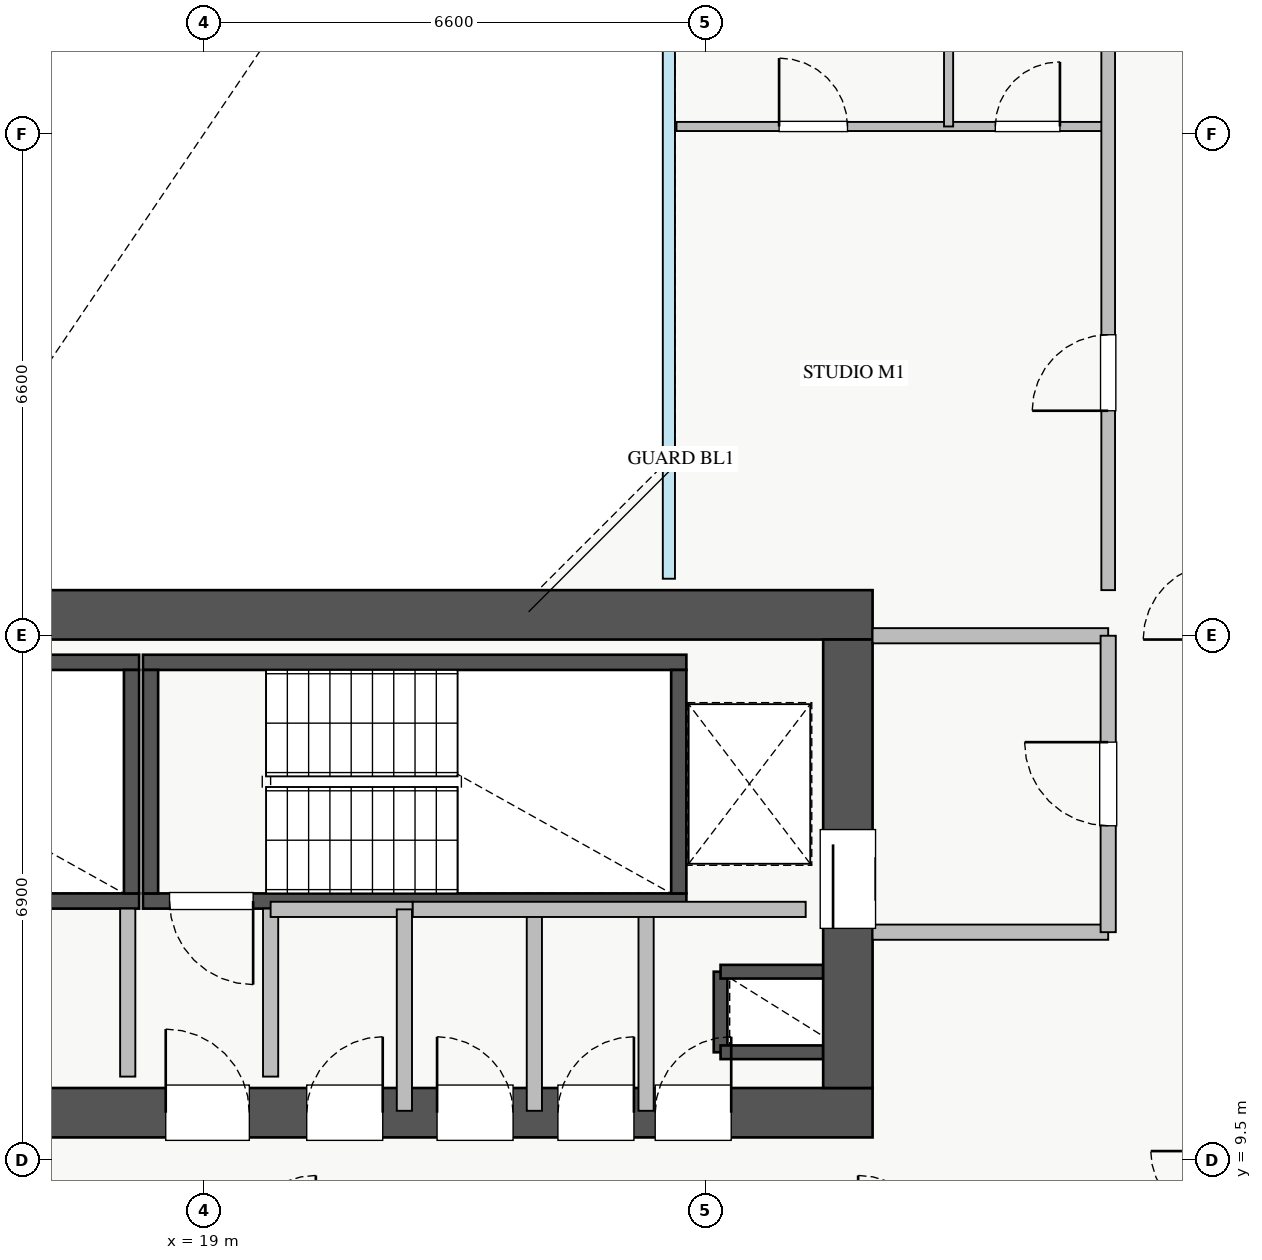
"""IFC4 building model, lengths in metres.
Left out: names, types, materials, properties, quantities, classifications, styles, units other than length and angle.
Written with IfcOpenShell. Run it as: python <this file> out.ifc"""

import sys

from ifc_helpers import new_model, si_unit, direction, frame, frame_2d, origin, place, context, subcontext, project, spatial, rectangle, extrude, source, transform, mapped, element, fill, save


model = new_model("IFC4")
c1 = context("Model", 3, precision=1e-05, world=origin(), true_north=direction((0.0, 1.0)))
c2 = subcontext(c1, "Body", "Model", "MODEL_VIEW")
j1 = project(units=[si_unit("LENGTHUNIT", "METRE"), si_unit("PLANEANGLEUNIT", "RADIAN")], contexts=[c1])
p1 = place(None, origin())
s1 = spatial("IfcSite", under=j1, at=p1, CompositionType="ELEMENT")
p2 = place(p1, origin())
s2 = spatial("IfcBuilding", under=s1, at=p2, CompositionType="ELEMENT")
p3 = place(p2, frame((0.0, 0.0, 143.75)))
s3 = spatial("IfcBuildingStorey", under=s2, at=p3, CompositionType="ELEMENT", Elevation=143.75)
p4 = place(p3, frame((25.8, 10.92, 0.0), z_axis=(0.0, 0.0, 1.0), x_axis=(0.0, 1.0, 0.0)))
e1 = element("IfcWall", 1, at=p4, inside=s3, PredefinedType="SHEAR", context=c2, shape_type="SweptSolid", body=[
    extrude(rectangle(XDim=1.06, YDim=0.18, at=frame_2d((0.53, 0.0))), origin(), (0.0, 0.0, 1.0), 3.07),
])
for number, where, z_axis, x_axis in (
    (2, (25.8, 11.98, 0.0), (0.0, 0.0, 1.0), (1.0, 0.0, 0.0)),
    (3, (25.8, 10.92, 0.0), (0.0, 0.0, 1.0), (1.0, 0.0, 0.0)),
):
    element("IfcWall", number, at=place(p3, frame(where, z_axis=z_axis, x_axis=x_axis)), inside=s3, PredefinedType="SHEAR", context=c2, shape_type="SweptSolid", body=[
        extrude(rectangle(XDim=1.35, YDim=0.18, at=frame_2d((0.675, 0.0))), origin(), (0.0, 0.0, 1.0), 3.07),
    ])
p5 = place(p3, frame((10.85, 12.91, 0.0), z_axis=(0.0, 0.0, 1.0), x_axis=(1.0, 0.0, 0.0)))
e4 = element("IfcWall", 4, at=p5, inside=s3, PredefinedType="SHEAR", context=c2, shape_type="SweptSolid", body=[
    extrude(rectangle(XDim=7.3, YDim=0.2, at=frame_2d((3.65, 0.0))), origin(), (0.0, 0.0, 1.0), 3.25),
])
p6 = place(p5, frame((0.35, 0.0, 0.0)))
e5 = element("IfcOpeningElement", 5, at=p6, cuts=e4, PredefinedType="OPENING", context=c2, shape_type="SweptSolid", body=[
    extrude(rectangle(XDim=1.1, YDim=2.05, at=frame_2d((0.55, 1.025))), frame((0.0, 0.11, 0.0), z_axis=(0.0, -1.0, 0.0), x_axis=(1.0, 0.0, 0.0)), (0.0, 0.0, 1.0), 0.22),
])
p7 = place(p3, frame((10.85, 16.05, 0.0), z_axis=(0.0, 0.0, 1.0), x_axis=(1.0, 0.0, 0.0)))
e6 = element("IfcWall", 6, at=p7, inside=s3, PredefinedType="SHEAR", context=c2, shape_type="SweptSolid", body=[
    extrude(rectangle(XDim=7.3, YDim=0.2, at=frame_2d((3.65, 0.0))), origin(), (0.0, 0.0, 1.0), 3.25),
])
p8 = place(p3, frame((18.05, 13.01, 0.0), z_axis=(0.0, 0.0, 1.0), x_axis=(0.0, 1.0, 0.0)))
e7 = element("IfcWall", 7, at=p8, inside=s3, PredefinedType="SHEAR", context=c2, shape_type="SweptSolid", body=[
    extrude(rectangle(XDim=2.94, YDim=0.2, at=frame_2d((1.47, 0.0))), origin(), (0.0, 0.0, 1.0), 3.25),
])
p9 = place(p3, frame((18.2, 12.91, 0.0), z_axis=(0.0, 0.0, 1.0), x_axis=(1.0, 0.0, 0.0)))
e8 = element("IfcWall", 8, at=p9, inside=s3, PredefinedType="SHEAR", context=c2, shape_type="SweptSolid", body=[
    extrude(rectangle(XDim=7.15, YDim=0.2, at=frame_2d((3.575, 0.0))), origin(), (0.0, 0.0, 1.0), 3.25),
])
p10 = place(p9, frame((0.35, 0.0, 0.0)))
e9 = element("IfcOpeningElement", 9, at=p10, cuts=e8, PredefinedType="OPENING", context=c2, shape_type="SweptSolid", body=[
    extrude(rectangle(XDim=1.1, YDim=2.05, at=frame_2d((0.55, 1.025))), frame((0.0, 0.11, 0.0), z_axis=(0.0, -1.0, 0.0), x_axis=(1.0, 0.0, 0.0)), (0.0, 0.0, 1.0), 0.22),
])
p11 = place(p3, frame((18.2, 16.05, 0.0), z_axis=(0.0, 0.0, 1.0), x_axis=(1.0, 0.0, 0.0)))
e10 = element("IfcWall", 10, at=p11, inside=s3, PredefinedType="SHEAR", context=c2, shape_type="SweptSolid", body=[
    extrude(rectangle(XDim=7.15, YDim=0.2, at=frame_2d((3.575, 0.0))), origin(), (0.0, 0.0, 1.0), 3.25),
])
for number, where, z_axis, x_axis in (
    (11, (18.3, 13.01, 0.0), (0.0, 0.0, 1.0), (0.0, 1.0, 0.0)),
    (12, (25.25, 13.01, 0.0), (0.0, 0.0, 1.0), (0.0, 1.0, 0.0)),
):
    element("IfcWall", number, at=place(p3, frame(where, z_axis=z_axis, x_axis=x_axis)), inside=s3, PredefinedType="SHEAR", context=c2, shape_type="SweptSolid", body=[
        extrude(rectangle(XDim=2.94, YDim=0.2, at=frame_2d((1.47, 0.0))), origin(), (0.0, 0.0, 1.0), 3.25),
    ])
p12 = place(p3, frame((10.2, 10.125, 0.0), z_axis=(0.0, 0.0, 1.0), x_axis=(1.0, 0.0, 0.0)))
e13 = element("IfcWall", 13, at=p12, inside=s3, PredefinedType="SHEAR", context=c2, shape_type="SweptSolid", body=[
    extrude(rectangle(XDim=17.6, YDim=0.65, at=frame_2d((8.8, 0.0))), origin(), (0.0, 0.0, 1.0), 3.25),
])
p13 = place(p12, frame((1.15, 0.0, 0.0)))
e14 = element("IfcOpeningElement", 14, at=p13, cuts=e13, PredefinedType="OPENING", context=c2, shape_type="SweptSolid", body=[
    extrude(rectangle(XDim=1.1, YDim=2.05, at=frame_2d((0.55, 1.025))), frame((0.0, 0.335, 0.0), z_axis=(0.0, -1.0, 0.0), x_axis=(1.0, 0.0, 0.0)), (0.0, 0.0, 1.0), 0.67),
])
p14 = place(p12, frame((8.3, 0.0, 0.0)))
e15 = element("IfcOpeningElement", 15, at=p14, cuts=e13, PredefinedType="OPENING", context=c2, shape_type="SweptSolid", body=[
    extrude(rectangle(XDim=1.1, YDim=2.05, at=frame_2d((0.55, 1.025))), frame((0.0, 0.335, 0.0), z_axis=(0.0, -1.0, 0.0), x_axis=(1.0, 0.0, 0.0)), (0.0, 0.0, 1.0), 0.67),
])
p15 = place(p12, frame((4.9, 0.0, 0.0)))
e16 = element("IfcOpeningElement", 16, at=p15, cuts=e13, PredefinedType="OPENING", context=c2, shape_type="SweptSolid", body=[
    extrude(rectangle(XDim=1.1, YDim=2.05, at=frame_2d((0.55, 1.025))), frame((0.0, 0.335, 0.0), z_axis=(0.0, -1.0, 0.0), x_axis=(1.0, 0.0, 0.0)), (0.0, 0.0, 1.0), 0.67),
])
p16 = place(p12, frame((14.74, 0.0, 0.0)))
e17 = element("IfcOpeningElement", 17, at=p16, cuts=e13, PredefinedType="OPENING", context=c2, shape_type="SweptSolid", body=[
    extrude(rectangle(XDim=1.0, YDim=2.05, at=frame_2d((0.5, 1.025))), frame((0.0, 0.335, 0.0), z_axis=(0.0, -1.0, 0.0), x_axis=(1.0, 0.0, 0.0)), (0.0, 0.0, 1.0), 0.67),
])
p17 = place(p12, frame((10.155, 0.0, 0.0)))
e18 = element("IfcOpeningElement", 18, at=p17, cuts=e13, PredefinedType="OPENING", context=c2, shape_type="SweptSolid", body=[
    extrude(rectangle(XDim=1.0, YDim=2.05, at=frame_2d((0.5, 1.025))), frame((0.0, 0.335, 0.0), z_axis=(0.0, -1.0, 0.0), x_axis=(1.0, 0.0, 0.0)), (0.0, 0.0, 1.0), 0.67),
])
p18 = place(p12, frame((11.87, 0.0, 0.0)))
e19 = element("IfcOpeningElement", 19, at=p18, cuts=e13, PredefinedType="OPENING", context=c2, shape_type="SweptSolid", body=[
    extrude(rectangle(XDim=1.0, YDim=2.05, at=frame_2d((0.5, 1.025))), frame((0.0, 0.335, 0.0), z_axis=(0.0, -1.0, 0.0), x_axis=(1.0, 0.0, 0.0)), (0.0, 0.0, 1.0), 0.67),
])
p19 = place(p12, frame((13.46, 0.0, 0.0)))
e20 = element("IfcOpeningElement", 20, at=p19, cuts=e13, PredefinedType="OPENING", context=c2, shape_type="SweptSolid", body=[
    extrude(rectangle(XDim=1.0, YDim=2.05, at=frame_2d((0.5, 1.025))), frame((0.0, 0.335, 0.0), z_axis=(0.0, -1.0, 0.0), x_axis=(1.0, 0.0, 0.0)), (0.0, 0.0, 1.0), 0.67),
])
p20 = place(p3, frame((10.2, 16.675, 0.0), z_axis=(0.0, 0.0, 1.0), x_axis=(1.0, 0.0, 0.0)))
e21 = element("IfcWall", 21, at=p20, inside=s3, PredefinedType="SHEAR", context=c2, shape_type="SweptSolid", body=[
    extrude(rectangle(XDim=17.6, YDim=0.65, at=frame_2d((8.8, 0.0))), origin(), (0.0, 0.0, 1.0), 3.25),
])
p21 = place(p3, frame((27.475, 10.45, 0.0), z_axis=(0.0, 0.0, 1.0), x_axis=(0.0, 1.0, 0.0)))
e22 = element("IfcWall", 22, at=p21, inside=s3, PredefinedType="SHEAR", context=c2, shape_type="SweptSolid", body=[
    extrude(rectangle(XDim=5.9, YDim=0.65, at=frame_2d((2.95, 0.0))), origin(), (0.0, 0.0, 1.0), 3.25),
])
p22 = place(p21, frame((2.1, 0.0, 0.0)))
e23 = element("IfcOpeningElement", 23, at=p22, cuts=e22, PredefinedType="OPENING", context=c2, shape_type="SweptSolid", body=[
    extrude(rectangle(XDim=1.3, YDim=2.05, at=frame_2d((0.65, 1.025))), frame((0.0, 0.335, 0.0), z_axis=(0.0, -1.0, 0.0), x_axis=(1.0, 0.0, 0.0)), (0.0, 0.0, 1.0), 0.67),
])
for number, where, z_axis, x_axis in (
    (24, (27.8, 16.4, 0.0), (0.0, 0.0, 1.0), (1.0, 0.0, 0.0)),
    (25, (27.8, 12.5, 0.0), (0.0, 0.0, 1.0), (1.0, 0.0, 0.0)),
):
    element("IfcWall", number, at=place(p3, frame(where, z_axis=z_axis, x_axis=x_axis)), inside=s3, PredefinedType="PARTITIONING", context=c2, shape_type="SweptSolid", body=[
        extrude(rectangle(XDim=3.1, YDim=0.2, at=frame_2d((1.55, 0.0))), origin(), (0.0, 0.0, 1.0), 3.07),
    ])
p23 = place(p3, frame((30.9, 12.5, 0.0), z_axis=(0.0, 0.0, 1.0), x_axis=(0.0, 1.0, 0.0)))
e26 = element("IfcWall", 26, at=p23, inside=s3, PredefinedType="PARTITIONING", context=c2, shape_type="SweptSolid", body=[
    extrude(rectangle(XDim=3.9, YDim=0.2, at=frame_2d((1.95, 0.0))), origin(), (0.0, 0.0, 1.0), 3.07),
])
p24 = place(p23, frame((1.4, 0.0, 0.0)))
e27 = element("IfcOpeningElement", 27, at=p24, cuts=e26, PredefinedType="OPENING", context=c2, shape_type="SweptSolid", body=[
    extrude(rectangle(XDim=1.1, YDim=2.05, at=frame_2d((0.55, 1.025))), frame((0.0, 0.11, 0.0), z_axis=(0.0, -1.0, 0.0), x_axis=(1.0, 0.0, 0.0)), (0.0, 0.0, 1.0), 0.22),
])
for number, where, z_axis, x_axis in (
    (28, (18.0, 10.6, 0.0), (0.0, 0.0, 1.0), (0.0, 1.0, 0.0)),
    (29, (19.88, 10.6, 0.0), (0.0, 0.0, 1.0), (0.0, 1.0, 0.0)),
):
    element("IfcWall", number, at=place(p3, frame(where, z_axis=z_axis, x_axis=x_axis)), inside=s3, PredefinedType="PARTITIONING", context=c2, shape_type="SweptSolid", body=[
        extrude(rectangle(XDim=2.21, YDim=0.2, at=frame_2d((1.105, 0.0))), origin(), (0.0, 0.0, 1.0), 3.07),
    ])
p25 = place(p3, frame((24.82, 10.15, 0.0), z_axis=(0.0, 0.0, 1.0), x_axis=(0.0, 1.0, 0.0)))
e30 = element("IfcWall", 30, at=p25, inside=s3, PredefinedType="PARTITIONING", context=c2, shape_type="SweptSolid", body=[
    extrude(rectangle(XDim=2.65, YDim=0.2, at=frame_2d((1.325, 0.0))), origin(), (0.0, 0.0, 1.0), 3.07),
])
p26 = place(p3, frame((19.88, 12.8, 0.0), z_axis=(0.0, 0.0, 1.0), x_axis=(1.0, 0.0, 0.0)))
e31 = element("IfcWall", 31, at=p26, inside=s3, PredefinedType="PARTITIONING", context=c2, shape_type="SweptSolid", body=[
    extrude(rectangle(XDim=1.87, YDim=0.2, at=frame_2d((0.935, 0.0))), origin(), (0.0, 0.0, 1.0), 3.07),
])
for number, where, z_axis, x_axis in (
    (32, (21.64, 10.15, 0.0), (0.0, 0.0, 1.0), (0.0, 1.0, 0.0)),
    (33, (23.35, 10.15, 0.0), (0.0, 0.0, 1.0), (0.0, 1.0, 0.0)),
):
    element("IfcWall", number, at=place(p3, frame(where, z_axis=z_axis, x_axis=x_axis)), inside=s3, PredefinedType="PARTITIONING", context=c2, shape_type="SweptSolid", body=[
        extrude(rectangle(XDim=2.65, YDim=0.2, at=frame_2d((1.325, 0.0))), origin(), (0.0, 0.0, 1.0), 3.07),
    ])
p27 = place(p3, frame((21.75, 12.8, 0.0), z_axis=(0.0, 0.0, 1.0), x_axis=(1.0, 0.0, 0.0)))
e34 = element("IfcWall", 34, at=p27, inside=s3, PredefinedType="PARTITIONING", context=c2, shape_type="SweptSolid", body=[
    extrude(rectangle(XDim=5.17, YDim=0.2, at=frame_2d((2.585, 0.0))), origin(), (0.0, 0.0, 1.0), 3.07),
])
p28 = place(p3, frame((25.22, 23.1, 0.0), z_axis=(0.0, 0.0, 1.0), x_axis=(1.0, 0.0, 0.0)))
e35 = element("IfcWall", 35, at=p28, inside=s3, PredefinedType="PLUMBINGWALL", context=c2, shape_type="SweptSolid", body=[
    extrude(rectangle(XDim=5.68, YDim=0.12, at=frame_2d((2.84, 0.0))), origin(), (0.0, 0.0, 1.0), 3.07),
])
p29 = place(p28, frame((1.35, 0.0, 0.0)))
e36 = element("IfcOpeningElement", 36, at=p29, cuts=e35, PredefinedType="OPENING", context=c2, shape_type="SweptSolid", body=[
    extrude(rectangle(XDim=0.9, YDim=2.05, at=frame_2d((0.45, 1.025))), frame((0.0, 0.07, 0.0), z_axis=(0.0, -1.0, 0.0), x_axis=(1.0, 0.0, 0.0)), (0.0, 0.0, 1.0), 0.14),
])
p30 = place(p28, frame((4.195, 0.0, 0.0)))
e37 = element("IfcOpeningElement", 37, at=p30, cuts=e35, PredefinedType="OPENING", context=c2, shape_type="SweptSolid", body=[
    extrude(rectangle(XDim=0.85, YDim=2.05, at=frame_2d((0.425, 1.025))), frame((0.0, 0.07, 0.0), z_axis=(0.0, -1.0, 0.0), x_axis=(1.0, 0.0, 0.0)), (0.0, 0.0, 1.0), 0.14),
])
p31 = place(p3, frame((28.8, 23.1, 0.0), z_axis=(0.0, 0.0, 1.0), x_axis=(0.0, 1.0, 0.0)))
e38 = element("IfcWall", 38, at=p31, inside=s3, PredefinedType="PLUMBINGWALL", context=c2, shape_type="SweptSolid", body=[
    extrude(rectangle(XDim=5.9, YDim=0.12, at=frame_2d((2.95, 0.0))), origin(), (0.0, 0.0, 1.0), 3.07),
])
p32 = place(p3, frame((30.9, 17.0, 0.0), z_axis=(0.0, 0.0, 1.0), x_axis=(0.0, 1.0, 0.0)))
e39 = element("IfcWall", 39, at=p32, inside=s3, PredefinedType="PARTITIONING", context=c2, shape_type="SweptSolid", body=[
    extrude(rectangle(XDim=12.0, YDim=0.18, at=frame_2d((6.0, 0.0))), origin(), (0.0, 0.0, 1.0), 3.07),
])
p33 = place(p32, frame((2.36, 0.0, 0.0)))
e40 = element("IfcOpeningElement", 40, at=p33, cuts=e39, PredefinedType="OPENING", context=c2, shape_type="SweptSolid", body=[
    extrude(rectangle(XDim=1.0, YDim=2.05, at=frame_2d((0.5, 1.025))), frame((0.0, 0.1, 0.0), z_axis=(0.0, -1.0, 0.0), x_axis=(1.0, 0.0, 0.0)), (0.0, 0.0, 1.0), 0.2),
])
m1 = source(origin(), c2, "Body", "SweptSolid", [
    extrude(rectangle(XDim=1.3, YDim=2.05, at=frame_2d((0.65, 1.025))), frame((0.0, 0.025, 0.0), z_axis=(0.0, -1.0, 0.0), x_axis=(1.0, 0.0, 0.0)), (0.0, 0.0, 1.0), 0.05),
])
p34 = place(p22, origin())
e41 = element("IfcDoor", 41, at=p34, inside=s3, OperationType="SLIDING_TO_RIGHT", PredefinedType="DOOR", context=c2, shape_type="MappedRepresentation", body=[
    mapped(m1, transform((0.0, 0.0, 0.0), x_axis=(1.0, 0.0, 0.0), y_axis=(0.0, 1.0, 0.0), z_axis=(0.0, 0.0, 1.0), scale=1.0)),
])
fill(e23, e41)
m2 = source(origin(), c2, "Body", "SweptSolid", [
    extrude(rectangle(XDim=1.1, YDim=2.05, at=frame_2d((0.55, 1.025))), frame((0.0, 0.025, 0.0), z_axis=(0.0, -1.0, 0.0), x_axis=(1.0, 0.0, 0.0)), (0.0, 0.0, 1.0), 0.05),
])
p35 = place(p14, origin())
e42 = element("IfcDoor", 42, at=p35, inside=s3, OperationType="SINGLE_SWING_LEFT", PredefinedType="DOOR", context=c2, shape_type="MappedRepresentation", body=[
    mapped(m2, transform((0.0, 0.0, 0.0), x_axis=(1.0, 0.0, 0.0), y_axis=(0.0, 1.0, 0.0), z_axis=(0.0, 0.0, 1.0), scale=1.0)),
])
fill(e15, e42)
p36 = place(p10, frame((1.1, 0.0, 0.0), z_axis=(0.0, 0.0, 1.0), x_axis=(-1.0, 0.0, 0.0)))
e43 = element("IfcDoor", 43, at=p36, inside=s3, OperationType="SINGLE_SWING_RIGHT", PredefinedType="DOOR", context=c2, shape_type="MappedRepresentation", body=[
    mapped(m2, transform((0.0, 0.0, 0.0), x_axis=(1.0, 0.0, 0.0), y_axis=(0.0, 1.0, 0.0), z_axis=(0.0, 0.0, 1.0), scale=1.0)),
])
fill(e9, e43)
m3 = source(origin(), c2, "Body", "SweptSolid", [
    extrude(rectangle(XDim=1.0, YDim=2.05, at=frame_2d((0.5, 1.025))), frame((0.0, 0.025, 0.0), z_axis=(0.0, -1.0, 0.0), x_axis=(1.0, 0.0, 0.0)), (0.0, 0.0, 1.0), 0.05),
])
p37 = place(p16, origin())
e44 = element("IfcDoor", 44, at=p37, inside=s3, OperationType="SINGLE_SWING_RIGHT", PredefinedType="DOOR", context=c2, shape_type="MappedRepresentation", body=[
    mapped(m3, transform((0.0, 0.0, 0.0), x_axis=(1.0, 0.0, 0.0), y_axis=(0.0, 1.0, 0.0), z_axis=(0.0, 0.0, 1.0), scale=1.0)),
])
fill(e17, e44)
p38 = place(p17, origin())
e45 = element("IfcDoor", 45, at=p38, inside=s3, OperationType="SINGLE_SWING_RIGHT", PredefinedType="DOOR", context=c2, shape_type="MappedRepresentation", body=[
    mapped(m3, transform((0.0, 0.0, 0.0), x_axis=(1.0, 0.0, 0.0), y_axis=(0.0, 1.0, 0.0), z_axis=(0.0, 0.0, 1.0), scale=1.0)),
])
fill(e18, e45)
p39 = place(p18, origin())
e46 = element("IfcDoor", 46, at=p39, inside=s3, OperationType="SINGLE_SWING_LEFT", PredefinedType="DOOR", context=c2, shape_type="MappedRepresentation", body=[
    mapped(m3, transform((0.0, 0.0, 0.0), x_axis=(1.0, 0.0, 0.0), y_axis=(0.0, 1.0, 0.0), z_axis=(0.0, 0.0, 1.0), scale=1.0)),
])
fill(e19, e46)
p40 = place(p19, origin())
e47 = element("IfcDoor", 47, at=p40, inside=s3, OperationType="SINGLE_SWING_RIGHT", PredefinedType="DOOR", context=c2, shape_type="MappedRepresentation", body=[
    mapped(m3, transform((0.0, 0.0, 0.0), x_axis=(1.0, 0.0, 0.0), y_axis=(0.0, 1.0, 0.0), z_axis=(0.0, 0.0, 1.0), scale=1.0)),
])
fill(e20, e47)
p41 = place(p24, origin())
e48 = element("IfcDoor", 48, at=p41, inside=s3, OperationType="SINGLE_SWING_RIGHT", PredefinedType="DOOR", context=c2, shape_type="MappedRepresentation", body=[
    mapped(m2, transform((0.0, 0.0, 0.0), x_axis=(1.0, 0.0, 0.0), y_axis=(0.0, 1.0, 0.0), z_axis=(0.0, 0.0, 1.0), scale=1.0)),
])
fill(e27, e48)
m4 = source(origin(), c2, "Body", "SweptSolid", [
    extrude(rectangle(XDim=0.9, YDim=2.05, at=frame_2d((0.45, 1.025))), frame((0.0, 0.025, 0.0), z_axis=(0.0, -1.0, 0.0), x_axis=(1.0, 0.0, 0.0)), (0.0, 0.0, 1.0), 0.05),
])
p42 = place(p29, origin())
e49 = element("IfcDoor", 49, at=p42, inside=s3, OperationType="SINGLE_SWING_LEFT", PredefinedType="DOOR", context=c2, shape_type="MappedRepresentation", body=[
    mapped(m4, transform((0.0, 0.0, 0.0), x_axis=(1.0, 0.0, 0.0), y_axis=(0.0, 1.0, 0.0), z_axis=(0.0, 0.0, 1.0), scale=1.0)),
])
fill(e36, e49)
m5 = source(origin(), c2, "Body", "SweptSolid", [
    extrude(rectangle(XDim=0.85, YDim=2.05, at=frame_2d((0.425, 1.025))), frame((0.0, 0.025, 0.0), z_axis=(0.0, -1.0, 0.0), x_axis=(1.0, 0.0, 0.0)), (0.0, 0.0, 1.0), 0.05),
])
p43 = place(p30, origin())
e50 = element("IfcDoor", 50, at=p43, inside=s3, OperationType="SINGLE_SWING_RIGHT", PredefinedType="DOOR", context=c2, shape_type="MappedRepresentation", body=[
    mapped(m5, transform((0.0, 0.0, 0.0), x_axis=(1.0, 0.0, 0.0), y_axis=(0.0, 1.0, 0.0), z_axis=(0.0, 0.0, 1.0), scale=1.0)),
])
fill(e37, e50)
p44 = place(p33, origin())
e51 = element("IfcDoor", 51, at=p44, inside=s3, OperationType="SINGLE_SWING_LEFT", PredefinedType="DOOR", context=c2, shape_type="MappedRepresentation", body=[
    mapped(m3, transform((0.0, 0.0, 0.0), x_axis=(1.0, 0.0, 0.0), y_axis=(0.0, 1.0, 0.0), z_axis=(0.0, 0.0, 1.0), scale=1.0)),
])
fill(e40, e51)
save(model, sys.argv[1])
